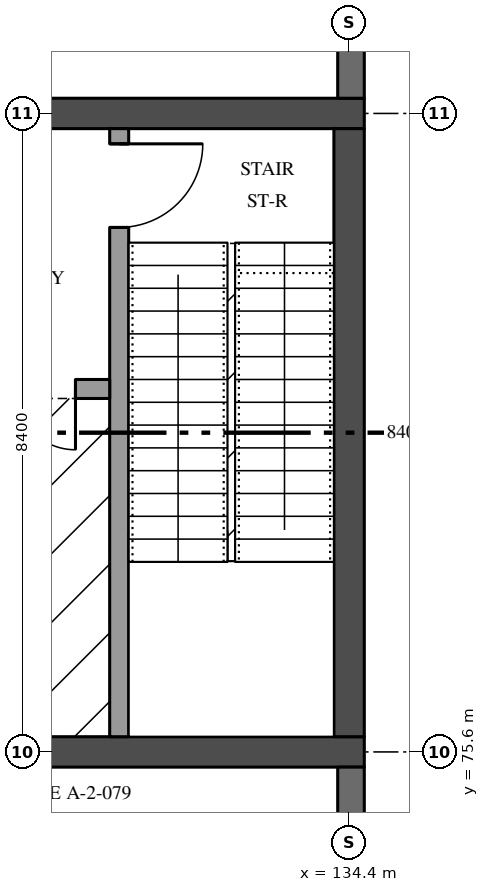
"""IFC4 building model, lengths in metres.
Left out: names, types, materials, properties, quantities, classifications, styles, units other than length and angle.
Written with IfcOpenShell. Run it as: python <this file> out.ifc"""

import sys

from ifc_helpers import new_model, si_unit, direction, frame, frame_2d, origin, place, context, subcontext, project, spatial, rectangle, extrude, element, fill, save


model = new_model("IFC4")
c1 = context("Model", 3, precision=1e-05, world=origin(), true_north=direction((0.0, 1.0)))
c2 = subcontext(c1, "Body", "Model", "MODEL_VIEW")
j1 = project(units=[si_unit("LENGTHUNIT", "METRE"), si_unit("PLANEANGLEUNIT", "RADIAN")], contexts=[c1])
p1 = place(None, origin())
s1 = spatial("IfcSite", under=j1, at=p1, CompositionType="ELEMENT")
p2 = place(p1, origin())
s2 = spatial("IfcBuilding", under=s1, at=p2, CompositionType="ELEMENT")
p3 = place(p2, frame((0.0, 0.0, 5.4)))
s3 = spatial("IfcBuildingStorey", under=s2, at=p3, CompositionType="ELEMENT", Elevation=5.4)
for number, where, z_axis, x_axis in (
    (1, (125.8, 75.6, 0.0), (0.0, 0.0, 1.0), (1.0, 0.0, 0.0)),
    (2, (125.8, 84.0, 0.0), (0.0, 0.0, 1.0), (1.0, 0.0, 0.0)),
):
    element("IfcWall", number, at=place(p3, frame(where, z_axis=z_axis, x_axis=x_axis)), inside=s3, PredefinedType="SHEAR", context=c2, shape_type="SweptSolid", body=[
        extrude(rectangle(XDim=8.8, YDim=0.4, at=frame_2d((4.4, 0.0))), origin(), (0.0, 0.0, 1.0), 4.37),
    ])
p4 = place(p3, frame((134.4, 75.8, 0.0), z_axis=(0.0, 0.0, 1.0), x_axis=(0.0, 1.0, 0.0)))
e3 = element("IfcWall", 3, at=p4, inside=s3, PredefinedType="SHEAR", context=c2, shape_type="SweptSolid", body=[
    extrude(rectangle(XDim=8.0, YDim=0.4, at=frame_2d((4.0, 0.0))), origin(), (0.0, 0.0, 1.0), 4.37),
])
p5 = place(p3, frame((131.375, 83.8, 0.0), z_axis=(0.0, 0.0, 1.0), x_axis=(0.0, -1.0, 0.0)))
e4 = element("IfcWall", 4, at=p5, inside=s3, PredefinedType="SOLIDWALL", context=c2, shape_type="SweptSolid", body=[
    extrude(rectangle(XDim=8.0, YDim=0.25, at=frame_2d((4.0, 0.0))), origin(), (0.0, 0.0, 1.0), 4.37),
])
p6 = place(p5, frame((0.2, 0.0, 0.0)))
e5 = element("IfcOpeningElement", 5, at=p6, cuts=e4, PredefinedType="OPENING", context=c2, shape_type="SweptSolid", body=[
    extrude(rectangle(XDim=1.1, YDim=2.1, at=frame_2d((0.55, 1.05))), frame((0.0, 0.135, 0.0), z_axis=(0.0, -1.0, 0.0), x_axis=(1.0, 0.0, 0.0)), (0.0, 0.0, 1.0), 0.27),
])
p7 = place(p3, frame((131.25, 80.375, 0.0), z_axis=(0.0, 0.0, 1.0), x_axis=(-1.0, 0.0, 0.0)))
e6 = element("IfcWall", 6, at=p7, inside=s3, PredefinedType="SOLIDWALL", context=c2, shape_type="SweptSolid", body=[
    extrude(rectangle(XDim=2.0, YDim=0.25, at=frame_2d((1.0, 0.0))), origin(), (0.0, 0.0, 1.0), 4.37),
])
p8 = place(p7, frame((0.45, 0.0, 0.0)))
e7 = element("IfcOpeningElement", 7, at=p8, cuts=e6, PredefinedType="OPENING", context=c2, shape_type="SweptSolid", body=[
    extrude(rectangle(XDim=0.8, YDim=2.1, at=frame_2d((0.4, 1.05))), frame((0.0, 0.135, 0.0), z_axis=(0.0, -1.0, 0.0), x_axis=(1.0, 0.0, 0.0)), (0.0, 0.0, 1.0), 0.27),
])
p9 = place(p3, frame((134.425, 67.58, 0.0), z_axis=(0.0, 0.0, 1.0), x_axis=(0.0, 1.0, 0.0)))
e8 = element("IfcWall", 8, at=p9, inside=s3, PredefinedType="SOLIDWALL", context=c2, shape_type="SweptSolid", body=[
    extrude(rectangle(XDim=7.82, YDim=0.35, at=frame_2d((3.91, 0.0))), origin(), (0.0, 0.0, 1.0), 3.746),
])
p10 = place(p9, frame((2.02, 0.0, 1.5)))
e9 = element("IfcOpeningElement", 9, at=p10, cuts=e8, PredefinedType="OPENING", context=c2, shape_type="SweptSolid", body=[
    extrude(rectangle(XDim=1.5, YDim=1.65, at=frame_2d((0.75, 0.825))), frame((0.0, 0.185, 0.0), z_axis=(0.0, -1.0, 0.0), x_axis=(1.0, 0.0, 0.0)), (0.0, 0.0, 1.0), 0.37),
])
p11 = place(p9, frame((4.12, 0.0, 1.5)))
e10 = element("IfcOpeningElement", 10, at=p11, cuts=e8, PredefinedType="OPENING", context=c2, shape_type="SweptSolid", body=[
    extrude(rectangle(XDim=1.5, YDim=1.65, at=frame_2d((0.75, 0.825))), frame((0.0, 0.185, 0.0), z_axis=(0.0, -1.0, 0.0), x_axis=(1.0, 0.0, 0.0)), (0.0, 0.0, 1.0), 0.37),
])
p12 = place(p3, frame((134.425, 84.2, 0.0), z_axis=(0.0, 0.0, 1.0), x_axis=(0.0, 1.0, 0.0)))
e11 = element("IfcWall", 11, at=p12, inside=s3, PredefinedType="SOLIDWALL", context=c2, shape_type="SweptSolid", body=[
    extrude(rectangle(XDim=7.82, YDim=0.35, at=frame_2d((3.91, 0.0))), origin(), (0.0, 0.0, 1.0), 3.746),
])
p13 = place(p12, frame((0.7, 0.0, 1.5)))
e12 = element("IfcOpeningElement", 12, at=p13, cuts=e11, PredefinedType="OPENING", context=c2, shape_type="SweptSolid", body=[
    extrude(rectangle(XDim=0.3, YDim=1.5, at=frame_2d((0.15, 0.75))), frame((0.0, 0.185, 0.0), z_axis=(0.0, -1.0, 0.0), x_axis=(1.0, 0.0, 0.0)), (0.0, 0.0, 1.0), 0.37),
])
p14 = place(p12, frame((2.35, 0.0, 1.5)))
e13 = element("IfcOpeningElement", 13, at=p14, cuts=e11, PredefinedType="OPENING", context=c2, shape_type="SweptSolid", body=[
    extrude(rectangle(XDim=1.2, YDim=1.65, at=frame_2d((0.6, 0.825))), frame((0.0, 0.185, 0.0), z_axis=(0.0, -1.0, 0.0), x_axis=(1.0, 0.0, 0.0)), (0.0, 0.0, 1.0), 0.37),
])
p15 = place(p12, frame((4.9, 0.0, 1.5)))
e14 = element("IfcOpeningElement", 14, at=p15, cuts=e11, PredefinedType="OPENING", context=c2, shape_type="SweptSolid", body=[
    extrude(rectangle(XDim=0.3, YDim=1.5, at=frame_2d((0.15, 0.75))), frame((0.0, 0.185, 0.0), z_axis=(0.0, -1.0, 0.0), x_axis=(1.0, 0.0, 0.0)), (0.0, 0.0, 1.0), 0.37),
])
p16 = place(p8, origin())
e15 = element("IfcDoor", 15, at=p16, inside=s3, OperationType="SINGLE_SWING_RIGHT", PredefinedType="DOOR", context=c2, shape_type="SweptSolid", body=[
    extrude(rectangle(XDim=0.8, YDim=2.1, at=frame_2d((0.4, 1.05))), frame((0.0, 0.035, 0.0), z_axis=(0.0, -1.0, 0.0), x_axis=(1.0, 0.0, 0.0)), (0.0, 0.0, 1.0), 0.07),
])
fill(e7, e15)
p17 = place(p6, origin())
e16 = element("IfcDoor", 16, at=p17, inside=s3, OperationType="SINGLE_SWING_RIGHT", PredefinedType="DOOR", context=c2, shape_type="SweptSolid", body=[
    extrude(rectangle(XDim=1.1, YDim=2.1, at=frame_2d((0.55, 1.05))), frame((0.0, 0.035, 0.0), z_axis=(0.0, -1.0, 0.0), x_axis=(1.0, 0.0, 0.0)), (0.0, 0.0, 1.0), 0.07),
])
fill(e5, e16)
save(model, sys.argv[1])
